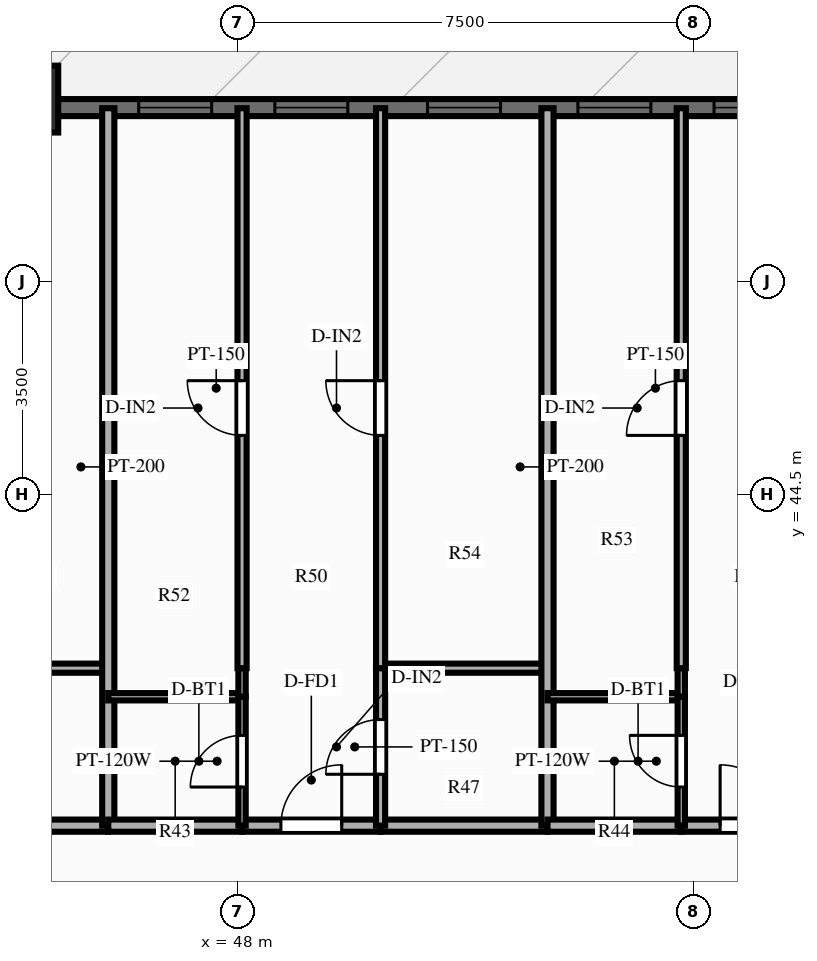
"""IFC4 building model, lengths in metres.
Left out: names, types, materials, properties, quantities, classifications, styles, units other than length and angle.
Written with IfcOpenShell. Run it as: python <this file> out.ifc"""

import sys

from ifc_helpers import new_model, si_unit, direction, frame, frame_2d, origin, origin_2d, place, context, subcontext, project, spatial, rectangle, extrude, source, transform, mapped, element, fill, save


model = new_model("IFC4")
c1 = context("Model", 3, precision=1e-05, world=origin(), true_north=direction((0.0, 1.0)))
c2 = subcontext(c1, "Body", "Model", "MODEL_VIEW")
j1 = project(units=[si_unit("LENGTHUNIT", "METRE"), si_unit("PLANEANGLEUNIT", "RADIAN")], contexts=[c1])
p1 = place(None, origin())
s1 = spatial("IfcSite", under=j1, at=p1, CompositionType="ELEMENT")
p2 = place(p1, origin())
s2 = spatial("IfcBuilding", under=s1, at=p2, CompositionType="ELEMENT")
p3 = place(p2, frame((0.0, 0.0, 19.4)))
s3 = spatial("IfcBuildingStorey", under=s2, at=p3, CompositionType="ELEMENT", Elevation=19.4)
m1 = source(origin(), c2, "Body", "SweptSolid", [
    extrude(rectangle(XDim=1.1, YDim=1.1, at=origin_2d()), origin(), (0.0, 0.0, 1.0), 3.0),
])
p4 = place(p3, frame((44.5, 51.0, 0.0), z_axis=(0.0, 0.0, 1.0), x_axis=(1.0, 0.0, 0.0)))
e1 = element("IfcColumn", 1, at=p4, inside=s3, PredefinedType="COLUMN", context=c2, shape_type="MappedRepresentation", body=[
    mapped(m1, transform((0.0, 0.0, 0.0), scale=1.0)),
])
p5 = place(p3, frame((15.5, 50.86, 0.0), z_axis=(0.0, 0.0, 1.0), x_axis=(1.0, 0.0, 0.0)))
e2 = element("IfcWall", 2, at=p5, inside=s3, PredefinedType="SOLIDWALL", context=c2, shape_type="SweptSolid", body=[
    extrude(rectangle(XDim=45.0, YDim=0.28, at=frame_2d((22.5, 0.0))), origin(), (0.0, 0.0, 1.0), 2.28),
])
p6 = place(p5, frame((0.76, 0.0, 0.25)))
e3 = element("IfcOpeningElement", 3, at=p6, cuts=e2, PredefinedType="OPENING", context=c2, shape_type="SweptSolid", body=[
    extrude(rectangle(XDim=1.2, YDim=1.5, at=frame_2d((0.6, 0.75))), frame((0.0, 0.152, 0.0), z_axis=(0.0, -1.0, 0.0), x_axis=(1.0, 0.0, 0.0)), (0.0, 0.0, 1.0), 0.304),
])
p7 = place(p5, frame((3.494, 0.0, 0.25)))
e4 = element("IfcOpeningElement", 4, at=p7, cuts=e2, PredefinedType="OPENING", context=c2, shape_type="SweptSolid", body=[
    extrude(rectangle(XDim=1.2, YDim=1.5, at=frame_2d((0.6, 0.75))), frame((0.0, 0.152, 0.0), z_axis=(0.0, -1.0, 0.0), x_axis=(1.0, 0.0, 0.0)), (0.0, 0.0, 1.0), 0.304),
])
p8 = place(p5, frame((8.741, 0.0, 0.25)))
e5 = element("IfcOpeningElement", 5, at=p8, cuts=e2, PredefinedType="OPENING", context=c2, shape_type="SweptSolid", body=[
    extrude(rectangle(XDim=1.2, YDim=1.5, at=frame_2d((0.6, 0.75))), frame((0.0, 0.152, 0.0), z_axis=(0.0, -1.0, 0.0), x_axis=(1.0, 0.0, 0.0)), (0.0, 0.0, 1.0), 0.304),
])
p9 = place(p5, frame((13.616, 0.0, 0.25)))
e6 = element("IfcOpeningElement", 6, at=p9, cuts=e2, PredefinedType="OPENING", context=c2, shape_type="SweptSolid", body=[
    extrude(rectangle(XDim=1.2, YDim=1.5, at=frame_2d((0.6, 0.75))), frame((0.0, 0.152, 0.0), z_axis=(0.0, -1.0, 0.0), x_axis=(1.0, 0.0, 0.0)), (0.0, 0.0, 1.0), 0.304),
])
p10 = place(p5, frame((17.146, 0.0, 0.25)))
e7 = element("IfcOpeningElement", 7, at=p10, cuts=e2, PredefinedType="OPENING", context=c2, shape_type="SweptSolid", body=[
    extrude(rectangle(XDim=1.2, YDim=1.5, at=frame_2d((0.6, 0.75))), frame((0.0, 0.152, 0.0), z_axis=(0.0, -1.0, 0.0), x_axis=(1.0, 0.0, 0.0)), (0.0, 0.0, 1.0), 0.304),
])
p11 = place(p5, frame((22.423, 0.0, 0.0)))
e8 = element("IfcOpeningElement", 8, at=p11, cuts=e2, PredefinedType="OPENING", context=c2, shape_type="SweptSolid", body=[
    extrude(rectangle(XDim=1.1, YDim=2.15, at=frame_2d((0.55, 1.075))), frame((0.0, 0.152, 0.0), z_axis=(0.0, -1.0, 0.0), x_axis=(1.0, 0.0, 0.0)), (0.0, 0.0, 1.0), 0.304),
])
p12 = place(p5, frame((27.252, 0.0, 0.25)))
e9 = element("IfcOpeningElement", 9, at=p12, cuts=e2, PredefinedType="OPENING", context=c2, shape_type="SweptSolid", body=[
    extrude(rectangle(XDim=0.95, YDim=1.5, at=frame_2d((0.475, 0.75))), frame((0.0, 0.152, 0.0), z_axis=(0.0, -1.0, 0.0), x_axis=(1.0, 0.0, 0.0)), (0.0, 0.0, 1.0), 0.304),
])
p13 = place(p5, frame((30.873, 0.0, 0.25)))
e10 = element("IfcOpeningElement", 10, at=p13, cuts=e2, PredefinedType="OPENING", context=c2, shape_type="SweptSolid", body=[
    extrude(rectangle(XDim=1.2, YDim=1.5, at=frame_2d((0.6, 0.75))), frame((0.0, 0.152, 0.0), z_axis=(0.0, -1.0, 0.0), x_axis=(1.0, 0.0, 0.0)), (0.0, 0.0, 1.0), 0.304),
])
p14 = place(p5, frame((33.113, 0.0, 0.25)))
e11 = element("IfcOpeningElement", 11, at=p14, cuts=e2, PredefinedType="OPENING", context=c2, shape_type="SweptSolid", body=[
    extrude(rectangle(XDim=1.2, YDim=1.5, at=frame_2d((0.6, 0.75))), frame((0.0, 0.152, 0.0), z_axis=(0.0, -1.0, 0.0), x_axis=(1.0, 0.0, 0.0)), (0.0, 0.0, 1.0), 0.304),
])
p15 = place(p5, frame((35.624, 0.0, 0.25)))
e12 = element("IfcOpeningElement", 12, at=p15, cuts=e2, PredefinedType="OPENING", context=c2, shape_type="SweptSolid", body=[
    extrude(rectangle(XDim=1.2, YDim=1.5, at=frame_2d((0.6, 0.75))), frame((0.0, 0.152, 0.0), z_axis=(0.0, -1.0, 0.0), x_axis=(1.0, 0.0, 0.0)), (0.0, 0.0, 1.0), 0.304),
])
p16 = place(p5, frame((38.097, 0.0, 0.25)))
e13 = element("IfcOpeningElement", 13, at=p16, cuts=e2, PredefinedType="OPENING", context=c2, shape_type="SweptSolid", body=[
    extrude(rectangle(XDim=1.2, YDim=1.5, at=frame_2d((0.6, 0.75))), frame((0.0, 0.152, 0.0), z_axis=(0.0, -1.0, 0.0), x_axis=(1.0, 0.0, 0.0)), (0.0, 0.0, 1.0), 0.304),
])
p17 = place(p5, frame((40.336, 0.0, 0.25)))
e14 = element("IfcOpeningElement", 14, at=p17, cuts=e2, PredefinedType="OPENING", context=c2, shape_type="SweptSolid", body=[
    extrude(rectangle(XDim=1.2, YDim=1.5, at=frame_2d((0.6, 0.75))), frame((0.0, 0.152, 0.0), z_axis=(0.0, -1.0, 0.0), x_axis=(1.0, 0.0, 0.0)), (0.0, 0.0, 1.0), 0.304),
])
p18 = place(p5, frame((42.743, 0.0, 0.25)))
e15 = element("IfcOpeningElement", 15, at=p18, cuts=e2, PredefinedType="OPENING", context=c2, shape_type="SweptSolid", body=[
    extrude(rectangle(XDim=1.2, YDim=1.5, at=frame_2d((0.6, 0.75))), frame((0.0, 0.152, 0.0), z_axis=(0.0, -1.0, 0.0), x_axis=(1.0, 0.0, 0.0)), (0.0, 0.0, 1.0), 0.304),
])
p19 = place(p3, frame((42.344, 39.05, 0.0), z_axis=(0.0, 0.0, 1.0), x_axis=(1.0, 0.0, 0.0)))
e16 = element("IfcWall", 16, at=p19, inside=s3, PredefinedType="PARTITIONING", context=c2, shape_type="SweptSolid", body=[
    extrude(rectangle(XDim=3.529, YDim=0.2, at=frame_2d((1.764, 0.0))), origin(), (0.0, 0.0, 1.0), 2.79),
])
p20 = place(p3, frame((42.344, 41.64, 0.0), z_axis=(0.0, 0.0, 1.0), x_axis=(1.0, 0.0, 0.0)))
e17 = element("IfcWall", 17, at=p20, inside=s3, PredefinedType="PARTITIONING", context=c2, shape_type="SweptSolid", body=[
    extrude(rectangle(XDim=3.529, YDim=0.15, at=frame_2d((1.764, 0.0))), origin(), (0.0, 0.0, 1.0), 2.79),
])
p21 = place(p3, frame((45.873, 39.05, 0.0), z_axis=(0.0, 0.0, 1.0), x_axis=(0.0, 1.0, 0.0)))
e18 = element("IfcWall", 18, at=p21, inside=s3, PredefinedType="PARTITIONING", context=c2, shape_type="SweptSolid", body=[
    extrude(rectangle(XDim=11.8, YDim=0.2, at=frame_2d((5.9, 0.0))), origin(), (0.0, 0.0, 1.0), 2.79),
])
p22 = place(p3, frame((45.873, 39.05, 0.0), z_axis=(0.0, 0.0, 1.0), x_axis=(1.0, 0.0, 0.0)))
e19 = element("IfcWall", 19, at=p22, inside=s3, PredefinedType="PARTITIONING", context=c2, shape_type="SweptSolid", body=[
    extrude(rectangle(XDim=2.2, YDim=0.2, at=frame_2d((1.1, 0.0))), origin(), (0.0, 0.0, 1.0), 2.79),
])
p23 = place(p3, frame((48.073, 39.05, 0.0), z_axis=(0.0, 0.0, 1.0), x_axis=(1.0, 0.0, 0.0)))
e20 = element("IfcWall", 20, at=p23, inside=s3, PredefinedType="PARTITIONING", context=c2, shape_type="SweptSolid", body=[
    extrude(rectangle(XDim=2.278, YDim=0.2, at=frame_2d((1.139, 0.0))), origin(), (0.0, 0.0, 1.0), 2.79),
])
p24 = place(p23, frame((0.639, 0.0, 0.0)))
e21 = element("IfcOpeningElement", 21, at=p24, cuts=e20, PredefinedType="OPENING", context=c2, shape_type="SweptSolid", body=[
    extrude(rectangle(XDim=1.0, YDim=2.15, at=frame_2d((0.5, 1.075))), frame((0.0, 0.112, 0.0), z_axis=(0.0, -1.0, 0.0), x_axis=(1.0, 0.0, 0.0)), (0.0, 0.0, 1.0), 0.224),
])
p25 = place(p3, frame((50.352, 39.05, 0.0), z_axis=(0.0, 0.0, 1.0), x_axis=(1.0, 0.0, 0.0)))
e22 = element("IfcWall", 22, at=p25, inside=s3, PredefinedType="PARTITIONING", context=c2, shape_type="SweptSolid", body=[
    extrude(rectangle(XDim=2.745, YDim=0.2, at=frame_2d((1.373, 0.0))), origin(), (0.0, 0.0, 1.0), 2.79),
])
p26 = place(p3, frame((45.873, 41.17, 0.0), z_axis=(0.0, 0.0, 1.0), x_axis=(1.0, 0.0, 0.0)))
e23 = element("IfcWall", 23, at=p26, inside=s3, PredefinedType="PARTITIONING", context=c2, shape_type="SweptSolid", body=[
    extrude(rectangle(XDim=2.2, YDim=0.12, at=frame_2d((1.1, 0.0))), origin(), (0.0, 0.0, 1.0), 2.79),
])
p27 = place(p3, frame((50.352, 41.64, 0.0), z_axis=(0.0, 0.0, 1.0), x_axis=(1.0, 0.0, 0.0)))
e24 = element("IfcWall", 24, at=p27, inside=s3, PredefinedType="PARTITIONING", context=c2, shape_type="SweptSolid", body=[
    extrude(rectangle(XDim=2.745, YDim=0.15, at=frame_2d((1.373, 0.0))), origin(), (0.0, 0.0, 1.0), 2.79),
])
p28 = place(p3, frame((48.073, 39.05, 0.0), z_axis=(0.0, 0.0, 1.0), x_axis=(0.0, 1.0, 0.0)))
e25 = element("IfcWall", 25, at=p28, inside=s3, PredefinedType="PARTITIONING", context=c2, shape_type="SweptSolid", body=[
    extrude(rectangle(XDim=2.12, YDim=0.12, at=frame_2d((1.06, 0.0))), origin(), (0.0, 0.0, 1.0), 2.79),
])
p29 = place(p28, frame((0.635, 0.0, 0.0)))
e26 = element("IfcOpeningElement", 26, at=p29, cuts=e25, PredefinedType="OPENING", context=c2, shape_type="SweptSolid", body=[
    extrude(rectangle(XDim=0.85, YDim=2.05, at=frame_2d((0.425, 1.025))), frame((0.0, 0.072, 0.0), z_axis=(0.0, -1.0, 0.0), x_axis=(1.0, 0.0, 0.0)), (0.0, 0.0, 1.0), 0.144),
])
p30 = place(p3, frame((48.073, 41.17, 0.0), z_axis=(0.0, 0.0, 1.0), x_axis=(0.0, 1.0, 0.0)))
e27 = element("IfcWall", 27, at=p30, inside=s3, PredefinedType="PARTITIONING", context=c2, shape_type="SweptSolid", body=[
    extrude(rectangle(XDim=0.47, YDim=0.12, at=frame_2d((0.235, 0.0))), origin(), (0.0, 0.0, 1.0), 2.79),
])
p31 = place(p3, frame((48.073, 41.64, 0.0), z_axis=(0.0, 0.0, 1.0), x_axis=(0.0, 1.0, 0.0)))
e28 = element("IfcWall", 28, at=p31, inside=s3, PredefinedType="PARTITIONING", context=c2, shape_type="SweptSolid", body=[
    extrude(rectangle(XDim=9.21, YDim=0.15, at=frame_2d((4.605, 0.0))), origin(), (0.0, 0.0, 1.0), 2.79),
])
p32 = place(p31, frame((3.829, 0.0, 0.0)))
e29 = element("IfcOpeningElement", 29, at=p32, cuts=e28, PredefinedType="OPENING", context=c2, shape_type="SweptSolid", body=[
    extrude(rectangle(XDim=0.9, YDim=2.1, at=frame_2d((0.45, 1.05))), frame((0.0, 0.087, 0.0), z_axis=(0.0, -1.0, 0.0), x_axis=(1.0, 0.0, 0.0)), (0.0, 0.0, 1.0), 0.174),
])
p33 = place(p3, frame((50.352, 39.05, 0.0), z_axis=(0.0, 0.0, 1.0), x_axis=(0.0, 1.0, 0.0)))
e30 = element("IfcWall", 30, at=p33, inside=s3, PredefinedType="PARTITIONING", context=c2, shape_type="SweptSolid", body=[
    extrude(rectangle(XDim=2.59, YDim=0.15, at=frame_2d((1.295, 0.0))), origin(), (0.0, 0.0, 1.0), 2.79),
])
p34 = place(p33, frame((0.845, 0.0, 0.0)))
e31 = element("IfcOpeningElement", 31, at=p34, cuts=e30, PredefinedType="OPENING", context=c2, shape_type="SweptSolid", body=[
    extrude(rectangle(XDim=0.9, YDim=2.1, at=frame_2d((0.45, 1.05))), frame((0.0, 0.087, 0.0), z_axis=(0.0, -1.0, 0.0), x_axis=(1.0, 0.0, 0.0)), (0.0, 0.0, 1.0), 0.174),
])
p35 = place(p3, frame((50.352, 41.64, 0.0), z_axis=(0.0, 0.0, 1.0), x_axis=(0.0, 1.0, 0.0)))
e32 = element("IfcWall", 32, at=p35, inside=s3, PredefinedType="PARTITIONING", context=c2, shape_type="SweptSolid", body=[
    extrude(rectangle(XDim=9.21, YDim=0.15, at=frame_2d((4.605, 0.0))), origin(), (0.0, 0.0, 1.0), 2.79),
])
p36 = place(p35, frame((3.829, 0.0, 0.0)))
e33 = element("IfcOpeningElement", 33, at=p36, cuts=e32, PredefinedType="OPENING", context=c2, shape_type="SweptSolid", body=[
    extrude(rectangle(XDim=0.9, YDim=2.1, at=frame_2d((0.45, 1.05))), frame((0.0, 0.087, 0.0), z_axis=(0.0, -1.0, 0.0), x_axis=(1.0, 0.0, 0.0)), (0.0, 0.0, 1.0), 0.174),
])
p37 = place(p3, frame((53.097, 39.05, 0.0), z_axis=(0.0, 0.0, 1.0), x_axis=(0.0, 1.0, 0.0)))
e34 = element("IfcWall", 34, at=p37, inside=s3, PredefinedType="PARTITIONING", context=c2, shape_type="SweptSolid", body=[
    extrude(rectangle(XDim=11.8, YDim=0.2, at=frame_2d((5.9, 0.0))), origin(), (0.0, 0.0, 1.0), 2.79),
])
p38 = place(p3, frame((53.097, 39.05, 0.0), z_axis=(0.0, 0.0, 1.0), x_axis=(1.0, 0.0, 0.0)))
e35 = element("IfcWall", 35, at=p38, inside=s3, PredefinedType="PARTITIONING", context=c2, shape_type="SweptSolid", body=[
    extrude(rectangle(XDim=2.2, YDim=0.2, at=frame_2d((1.1, 0.0))), origin(), (0.0, 0.0, 1.0), 2.79),
])
p39 = place(p3, frame((55.297, 39.05, 0.0), z_axis=(0.0, 0.0, 1.0), x_axis=(1.0, 0.0, 0.0)))
e36 = element("IfcWall", 36, at=p39, inside=s3, PredefinedType="PARTITIONING", context=c2, shape_type="SweptSolid", body=[
    extrude(rectangle(XDim=2.279, YDim=0.2, at=frame_2d((1.139, 0.0))), origin(), (0.0, 0.0, 1.0), 2.79),
])
p40 = place(p39, frame((0.639, 0.0, 0.0)))
e37 = element("IfcOpeningElement", 37, at=p40, cuts=e36, PredefinedType="OPENING", context=c2, shape_type="SweptSolid", body=[
    extrude(rectangle(XDim=1.0, YDim=2.15, at=frame_2d((0.5, 1.075))), frame((0.0, 0.112, 0.0), z_axis=(0.0, -1.0, 0.0), x_axis=(1.0, 0.0, 0.0)), (0.0, 0.0, 1.0), 0.224),
])
p41 = place(p3, frame((53.097, 41.17, 0.0), z_axis=(0.0, 0.0, 1.0), x_axis=(1.0, 0.0, 0.0)))
e38 = element("IfcWall", 38, at=p41, inside=s3, PredefinedType="PARTITIONING", context=c2, shape_type="SweptSolid", body=[
    extrude(rectangle(XDim=2.2, YDim=0.12, at=frame_2d((1.1, 0.0))), origin(), (0.0, 0.0, 1.0), 2.79),
])
p42 = place(p3, frame((55.297, 39.05, 0.0), z_axis=(0.0, 0.0, 1.0), x_axis=(0.0, 1.0, 0.0)))
e39 = element("IfcWall", 39, at=p42, inside=s3, PredefinedType="PARTITIONING", context=c2, shape_type="SweptSolid", body=[
    extrude(rectangle(XDim=2.12, YDim=0.12, at=frame_2d((1.06, 0.0))), origin(), (0.0, 0.0, 1.0), 2.79),
])
p43 = place(p42, frame((0.635, 0.0, 0.0)))
e40 = element("IfcOpeningElement", 40, at=p43, cuts=e39, PredefinedType="OPENING", context=c2, shape_type="SweptSolid", body=[
    extrude(rectangle(XDim=0.85, YDim=2.05, at=frame_2d((0.425, 1.025))), frame((0.0, 0.072, 0.0), z_axis=(0.0, -1.0, 0.0), x_axis=(1.0, 0.0, 0.0)), (0.0, 0.0, 1.0), 0.144),
])
p44 = place(p3, frame((55.297, 41.17, 0.0), z_axis=(0.0, 0.0, 1.0), x_axis=(0.0, 1.0, 0.0)))
e41 = element("IfcWall", 41, at=p44, inside=s3, PredefinedType="PARTITIONING", context=c2, shape_type="SweptSolid", body=[
    extrude(rectangle(XDim=0.47, YDim=0.12, at=frame_2d((0.235, 0.0))), origin(), (0.0, 0.0, 1.0), 2.79),
])
p45 = place(p3, frame((55.297, 41.64, 0.0), z_axis=(0.0, 0.0, 1.0), x_axis=(0.0, 1.0, 0.0)))
e42 = element("IfcWall", 42, at=p45, inside=s3, PredefinedType="PARTITIONING", context=c2, shape_type="SweptSolid", body=[
    extrude(rectangle(XDim=9.21, YDim=0.15, at=frame_2d((4.605, 0.0))), origin(), (0.0, 0.0, 1.0), 2.79),
])
p46 = place(p45, frame((3.829, 0.0, 0.0)))
e43 = element("IfcOpeningElement", 43, at=p46, cuts=e42, PredefinedType="OPENING", context=c2, shape_type="SweptSolid", body=[
    extrude(rectangle(XDim=0.9, YDim=2.1, at=frame_2d((0.45, 1.05))), frame((0.0, 0.087, 0.0), z_axis=(0.0, -1.0, 0.0), x_axis=(1.0, 0.0, 0.0)), (0.0, 0.0, 1.0), 0.174),
])
m2 = source(origin(), c2, "Body", "SweptSolid", [
    extrude(rectangle(XDim=1.2, YDim=1.5, at=frame_2d((0.6, 0.75))), frame((0.0, 0.03, 0.0), z_axis=(0.0, -1.0, 0.0), x_axis=(1.0, 0.0, 0.0)), (0.0, 0.0, 1.0), 0.06),
])
p47 = place(p13, origin())
e44 = element("IfcWindow", 44, at=p47, inside=s3, PartitioningType="SINGLE_PANEL", PredefinedType="WINDOW", context=c2, shape_type="MappedRepresentation", body=[
    mapped(m2, transform((0.0, 0.0, 0.0), scale=1.0)),
])
fill(e10, e44)
p48 = place(p14, origin())
e45 = element("IfcWindow", 45, at=p48, inside=s3, PartitioningType="SINGLE_PANEL", PredefinedType="WINDOW", context=c2, shape_type="MappedRepresentation", body=[
    mapped(m2, transform((0.0, 0.0, 0.0), scale=1.0)),
])
fill(e11, e45)
p49 = place(p15, origin())
e46 = element("IfcWindow", 46, at=p49, inside=s3, PartitioningType="SINGLE_PANEL", PredefinedType="WINDOW", context=c2, shape_type="MappedRepresentation", body=[
    mapped(m2, transform((0.0, 0.0, 0.0), scale=1.0)),
])
fill(e12, e46)
p50 = place(p16, origin())
e47 = element("IfcWindow", 47, at=p50, inside=s3, PartitioningType="SINGLE_PANEL", PredefinedType="WINDOW", context=c2, shape_type="MappedRepresentation", body=[
    mapped(m2, transform((0.0, 0.0, 0.0), scale=1.0)),
])
fill(e13, e47)
p51 = place(p17, origin())
e48 = element("IfcWindow", 48, at=p51, inside=s3, PartitioningType="SINGLE_PANEL", PredefinedType="WINDOW", context=c2, shape_type="MappedRepresentation", body=[
    mapped(m2, transform((0.0, 0.0, 0.0), scale=1.0)),
])
fill(e14, e48)
m3 = source(origin(), c2, "Body", "SweptSolid", [
    extrude(rectangle(XDim=1.0, YDim=2.15, at=frame_2d((0.5, 1.075))), frame((0.0, 0.025, 0.0), z_axis=(0.0, -1.0, 0.0), x_axis=(1.0, 0.0, 0.0)), (0.0, 0.0, 1.0), 0.05),
])
p52 = place(p24, origin())
e49 = element("IfcDoor", 49, at=p52, inside=s3, OperationType="SINGLE_SWING_RIGHT", PredefinedType="DOOR", context=c2, shape_type="MappedRepresentation", body=[
    mapped(m3, transform((0.0, 0.0, 0.0), scale=1.0)),
])
fill(e21, e49)
m4 = source(origin(), c2, "Body", "SweptSolid", [
    extrude(rectangle(XDim=0.85, YDim=2.05, at=frame_2d((0.425, 1.025))), frame((0.0, 0.025, 0.0), z_axis=(0.0, -1.0, 0.0), x_axis=(1.0, 0.0, 0.0)), (0.0, 0.0, 1.0), 0.05),
])
p53 = place(p29, origin())
e50 = element("IfcDoor", 50, at=p53, inside=s3, OperationType="SINGLE_SWING_LEFT", PredefinedType="DOOR", context=c2, shape_type="MappedRepresentation", body=[
    mapped(m4, transform((0.0, 0.0, 0.0), scale=1.0)),
])
fill(e26, e50)
m5 = source(origin(), c2, "Body", "SweptSolid", [
    extrude(rectangle(XDim=0.9, YDim=2.1, at=frame_2d((0.45, 1.05))), frame((0.0, 0.025, 0.0), z_axis=(0.0, -1.0, 0.0), x_axis=(1.0, 0.0, 0.0)), (0.0, 0.0, 1.0), 0.05),
])
p54 = place(p32, origin())
e51 = element("IfcDoor", 51, at=p54, inside=s3, OperationType="SINGLE_SWING_RIGHT", PredefinedType="DOOR", context=c2, shape_type="MappedRepresentation", body=[
    mapped(m5, transform((0.0, 0.0, 0.0), scale=1.0)),
])
fill(e29, e51)
p55 = place(p34, origin())
e52 = element("IfcDoor", 52, at=p55, inside=s3, OperationType="SINGLE_SWING_LEFT", PredefinedType="DOOR", context=c2, shape_type="MappedRepresentation", body=[
    mapped(m5, transform((0.0, 0.0, 0.0), scale=1.0)),
])
fill(e31, e52)
p56 = place(p36, origin())
e53 = element("IfcDoor", 53, at=p56, inside=s3, OperationType="SINGLE_SWING_RIGHT", PredefinedType="DOOR", context=c2, shape_type="MappedRepresentation", body=[
    mapped(m5, transform((0.0, 0.0, 0.0), scale=1.0)),
])
fill(e33, e53)
p57 = place(p40, origin())
e54 = element("IfcDoor", 54, at=p57, inside=s3, OperationType="SINGLE_SWING_LEFT", PredefinedType="DOOR", context=c2, shape_type="MappedRepresentation", body=[
    mapped(m3, transform((0.0, 0.0, 0.0), scale=1.0)),
])
fill(e37, e54)
p58 = place(p43, origin())
e55 = element("IfcDoor", 55, at=p58, inside=s3, OperationType="SINGLE_SWING_RIGHT", PredefinedType="DOOR", context=c2, shape_type="MappedRepresentation", body=[
    mapped(m4, transform((0.0, 0.0, 0.0), scale=1.0)),
])
fill(e40, e55)
p59 = place(p46, origin())
e56 = element("IfcDoor", 56, at=p59, inside=s3, OperationType="SINGLE_SWING_LEFT", PredefinedType="DOOR", context=c2, shape_type="MappedRepresentation", body=[
    mapped(m5, transform((0.0, 0.0, 0.0), scale=1.0)),
])
fill(e43, e56)
save(model, sys.argv[1])
